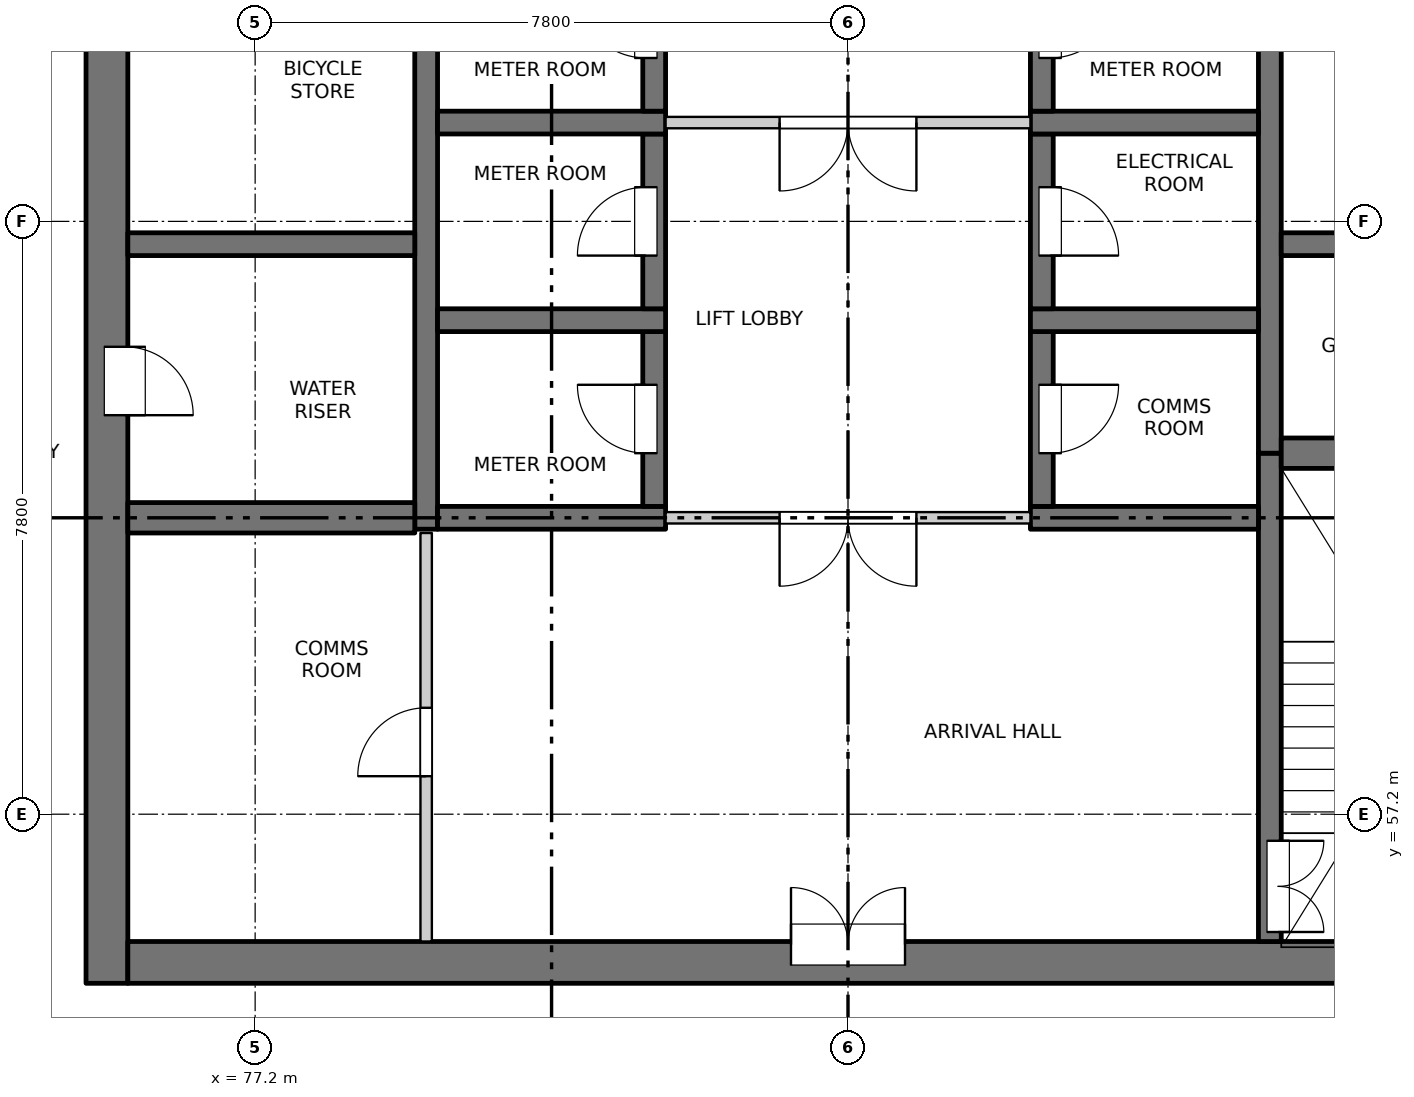
"""IFC4 building model, lengths in metres.
Left out: names, types, materials, properties, quantities, classifications, styles, units other than length and angle.
Written with IfcOpenShell. Run it as: python <this file> out.ifc"""

import sys

from ifc_helpers import new_model, si_unit, direction, frame, frame_2d, origin, place, context, subcontext, project, spatial, rectangle, extrude, element, fill, save


model = new_model("IFC4")
c1 = context("Model", 3, precision=1e-05, world=origin(), true_north=direction((0.0, 1.0)))
c2 = subcontext(c1, "Body", "Model", "MODEL_VIEW")
j1 = project(units=[si_unit("LENGTHUNIT", "METRE"), si_unit("PLANEANGLEUNIT", "RADIAN")], contexts=[c1])
p1 = place(None, origin())
s1 = spatial("IfcSite", under=j1, at=p1, CompositionType="ELEMENT")
p2 = place(p1, origin())
s2 = spatial("IfcBuilding", under=s1, at=p2, CompositionType="ELEMENT")
p3 = place(p2, frame((0.0, 0.0, 148.6)))
s3 = spatial("IfcBuildingStorey", under=s2, at=p3, CompositionType="ELEMENT", Elevation=148.6)
p4 = place(p3, frame((75.25, 54.975, -0.3), z_axis=(0.0, 0.0, 1.0), x_axis=(0.0, 1.0, 0.0)))
e1 = element("IfcWall", 1, at=p4, inside=s3, PredefinedType="SOLIDWALL", context=c2, shape_type="SweptSolid", body=[
    extrude(rectangle(XDim=22.325, YDim=0.55, at=frame_2d((11.163, 0.0))), origin(), (0.0, 0.0, 1.0), 3.45),
])
p5 = place(p4, frame((7.475, 0.0, 0.3)))
e2 = element("IfcOpeningElement", 2, at=p5, cuts=e1, PredefinedType="OPENING", context=c2, shape_type="SweptSolid", body=[
    extrude(rectangle(XDim=0.9, YDim=2.1, at=frame_2d((0.45, 1.05))), frame((0.0, 0.285, 0.0), z_axis=(0.0, -1.0, 0.0), x_axis=(1.0, 0.0, 0.0)), (0.0, 0.0, 1.0), 0.57),
])
p6 = place(p4, frame((13.775, 0.0, 0.3)))
e3 = element("IfcOpeningElement", 3, at=p6, cuts=e1, PredefinedType="OPENING", context=c2, shape_type="SweptSolid", body=[
    extrude(rectangle(XDim=0.9, YDim=2.1, at=frame_2d((0.45, 1.05))), frame((0.0, 0.285, 0.0), z_axis=(0.0, -1.0, 0.0), x_axis=(1.0, 0.0, 0.0)), (0.0, 0.0, 1.0), 0.57),
])
p7 = place(p4, frame((20.075, 0.0, 0.3)))
e4 = element("IfcOpeningElement", 4, at=p7, cuts=e1, PredefinedType="OPENING", context=c2, shape_type="SweptSolid", body=[
    extrude(rectangle(XDim=0.9, YDim=2.1, at=frame_2d((0.45, 1.05))), frame((0.0, 0.285, 0.0), z_axis=(0.0, -1.0, 0.0), x_axis=(1.0, 0.0, 0.0)), (0.0, 0.0, 1.0), 0.57),
])
p8 = place(p3, frame((75.525, 55.25, -0.3), z_axis=(0.0, 0.0, 1.0), x_axis=(1.0, 0.0, 0.0)))
e5 = element("IfcWall", 5, at=p8, inside=s3, PredefinedType="SOLIDWALL", context=c2, shape_type="SweptSolid", body=[
    extrude(rectangle(XDim=18.95, YDim=0.55, at=frame_2d((9.475, 0.0))), origin(), (0.0, 0.0, 1.0), 3.45),
])
p9 = place(p8, frame((8.725, 0.0, 0.3)))
e6 = element("IfcOpeningElement", 6, at=p9, cuts=e5, PredefinedType="OPENING", context=c2, shape_type="SweptSolid", body=[
    extrude(rectangle(XDim=1.5, YDim=2.1, at=frame_2d((0.75, 1.05))), frame((0.0, 0.285, 0.0), z_axis=(0.0, -1.0, 0.0), x_axis=(1.0, 0.0, 0.0)), (0.0, 0.0, 1.0), 0.57),
])
p10 = place(p3, frame((79.45, 60.95, -0.3), z_axis=(0.0, 0.0, 1.0), x_axis=(0.0, 1.0, 0.0)))
e7 = element("IfcWall", 7, at=p10, inside=s3, PredefinedType="SOLIDWALL", context=c2, shape_type="SweptSolid", body=[
    extrude(rectangle(XDim=16.35, YDim=0.3, at=frame_2d((8.175, 0.0))), origin(), (0.0, 0.0, 1.0), 3.45),
])
p11 = place(p3, frame((90.55, 55.525, -0.3), z_axis=(0.0, 0.0, 1.0), x_axis=(0.0, 1.0, 0.0)))
e8 = element("IfcWall", 8, at=p11, inside=s3, PredefinedType="SOLIDWALL", context=c2, shape_type="SweptSolid", body=[
    extrude(rectangle(XDim=6.425, YDim=0.3, at=frame_2d((3.212, 0.0))), origin(), (0.0, 0.0, 1.0), 3.45),
])
p12 = place(p11, frame((0.125, 0.0, 0.3)))
e9 = element("IfcOpeningElement", 9, at=p12, cuts=e8, PredefinedType="OPENING", context=c2, shape_type="SweptSolid", body=[
    extrude(rectangle(XDim=1.2, YDim=2.1, at=frame_2d((0.6, 1.05))), frame((0.0, 0.16, 0.0), z_axis=(0.0, -1.0, 0.0), x_axis=(1.0, 0.0, 0.0)), (0.0, 0.0, 1.0), 0.32),
])
p13 = place(p3, frame((90.55, 61.95, -0.3), z_axis=(0.0, 0.0, 1.0), x_axis=(0.0, 1.0, 0.0)))
e10 = element("IfcWall", 10, at=p13, inside=s3, PredefinedType="SOLIDWALL", context=c2, shape_type="SweptSolid", body=[
    extrude(rectangle(XDim=15.35, YDim=0.3, at=frame_2d((7.675, 0.0))), origin(), (0.0, 0.0, 1.0), 3.45),
])
p14 = place(p3, frame((79.6, 61.1, -0.3), z_axis=(0.0, 0.0, 1.0), x_axis=(1.0, 0.0, 0.0)))
e11 = element("IfcWall", 11, at=p14, inside=s3, PredefinedType="SOLIDWALL", context=c2, shape_type="SweptSolid", body=[
    extrude(rectangle(XDim=3.0, YDim=0.3, at=frame_2d((1.5, 0.0))), origin(), (0.0, 0.0, 1.0), 3.45),
])
p15 = place(p3, frame((82.45, 61.25, -0.3), z_axis=(0.0, 0.0, 1.0), x_axis=(0.0, 1.0, 0.0)))
e12 = element("IfcWall", 12, at=p15, inside=s3, PredefinedType="SOLIDWALL", context=c2, shape_type="SweptSolid", body=[
    extrude(rectangle(XDim=2.3, YDim=0.3, at=frame_2d((1.15, 0.0))), origin(), (0.0, 0.0, 1.0), 3.45),
])
p16 = place(p15, frame((0.7, 0.0, 0.3)))
e13 = element("IfcOpeningElement", 13, at=p16, cuts=e12, PredefinedType="OPENING", context=c2, shape_type="SweptSolid", body=[
    extrude(rectangle(XDim=0.9, YDim=2.1, at=frame_2d((0.45, 1.05))), frame((0.0, 0.16, 0.0), z_axis=(0.0, -1.0, 0.0), x_axis=(1.0, 0.0, 0.0)), (0.0, 0.0, 1.0), 0.32),
])
p17 = place(p3, frame((79.6, 63.7, -0.3), z_axis=(0.0, 0.0, 1.0), x_axis=(1.0, 0.0, 0.0)))
e14 = element("IfcWall", 14, at=p17, inside=s3, PredefinedType="SOLIDWALL", context=c2, shape_type="SweptSolid", body=[
    extrude(rectangle(XDim=3.0, YDim=0.3, at=frame_2d((1.5, 0.0))), origin(), (0.0, 0.0, 1.0), 3.45),
])
p18 = place(p3, frame((82.45, 63.85, -0.3), z_axis=(0.0, 0.0, 1.0), x_axis=(0.0, 1.0, 0.0)))
e15 = element("IfcWall", 15, at=p18, inside=s3, PredefinedType="SOLIDWALL", context=c2, shape_type="SweptSolid", body=[
    extrude(rectangle(XDim=2.3, YDim=0.3, at=frame_2d((1.15, 0.0))), origin(), (0.0, 0.0, 1.0), 3.45),
])
p19 = place(p18, frame((0.7, 0.0, 0.3)))
e16 = element("IfcOpeningElement", 16, at=p19, cuts=e15, PredefinedType="OPENING", context=c2, shape_type="SweptSolid", body=[
    extrude(rectangle(XDim=0.9, YDim=2.1, at=frame_2d((0.45, 1.05))), frame((0.0, 0.16, 0.0), z_axis=(0.0, -1.0, 0.0), x_axis=(1.0, 0.0, 0.0)), (0.0, 0.0, 1.0), 0.32),
])
p20 = place(p3, frame((79.6, 66.3, -0.3), z_axis=(0.0, 0.0, 1.0), x_axis=(1.0, 0.0, 0.0)))
e17 = element("IfcWall", 17, at=p20, inside=s3, PredefinedType="SOLIDWALL", context=c2, shape_type="SweptSolid", body=[
    extrude(rectangle(XDim=3.0, YDim=0.3, at=frame_2d((1.5, 0.0))), origin(), (0.0, 0.0, 1.0), 3.45),
])
p21 = place(p3, frame((82.45, 66.45, -0.3), z_axis=(0.0, 0.0, 1.0), x_axis=(0.0, 1.0, 0.0)))
e18 = element("IfcWall", 18, at=p21, inside=s3, PredefinedType="SOLIDWALL", context=c2, shape_type="SweptSolid", body=[
    extrude(rectangle(XDim=2.3, YDim=0.3, at=frame_2d((1.15, 0.0))), origin(), (0.0, 0.0, 1.0), 3.45),
])
p22 = place(p21, frame((0.7, 0.0, 0.3)))
e19 = element("IfcOpeningElement", 19, at=p22, cuts=e18, PredefinedType="OPENING", context=c2, shape_type="SweptSolid", body=[
    extrude(rectangle(XDim=0.9, YDim=2.1, at=frame_2d((0.45, 1.05))), frame((0.0, 0.16, 0.0), z_axis=(0.0, -1.0, 0.0), x_axis=(1.0, 0.0, 0.0)), (0.0, 0.0, 1.0), 0.32),
])
p23 = place(p3, frame((87.4, 61.1, -0.3), z_axis=(0.0, 0.0, 1.0), x_axis=(1.0, 0.0, 0.0)))
e20 = element("IfcWall", 20, at=p23, inside=s3, PredefinedType="SOLIDWALL", context=c2, shape_type="SweptSolid", body=[
    extrude(rectangle(XDim=3.0, YDim=0.3, at=frame_2d((1.5, 0.0))), origin(), (0.0, 0.0, 1.0), 3.45),
])
p24 = place(p3, frame((87.55, 61.25, -0.3), z_axis=(0.0, 0.0, 1.0), x_axis=(0.0, 1.0, 0.0)))
e21 = element("IfcWall", 21, at=p24, inside=s3, PredefinedType="SOLIDWALL", context=c2, shape_type="SweptSolid", body=[
    extrude(rectangle(XDim=2.3, YDim=0.3, at=frame_2d((1.15, 0.0))), origin(), (0.0, 0.0, 1.0), 3.45),
])
p25 = place(p24, frame((0.7, 0.0, 0.3)))
e22 = element("IfcOpeningElement", 22, at=p25, cuts=e21, PredefinedType="OPENING", context=c2, shape_type="SweptSolid", body=[
    extrude(rectangle(XDim=0.9, YDim=2.1, at=frame_2d((0.45, 1.05))), frame((0.0, 0.16, 0.0), z_axis=(0.0, -1.0, 0.0), x_axis=(1.0, 0.0, 0.0)), (0.0, 0.0, 1.0), 0.32),
])
p26 = place(p3, frame((87.4, 63.7, -0.3), z_axis=(0.0, 0.0, 1.0), x_axis=(1.0, 0.0, 0.0)))
e23 = element("IfcWall", 23, at=p26, inside=s3, PredefinedType="SOLIDWALL", context=c2, shape_type="SweptSolid", body=[
    extrude(rectangle(XDim=3.0, YDim=0.3, at=frame_2d((1.5, 0.0))), origin(), (0.0, 0.0, 1.0), 3.45),
])
p27 = place(p3, frame((87.55, 63.85, -0.3), z_axis=(0.0, 0.0, 1.0), x_axis=(0.0, 1.0, 0.0)))
e24 = element("IfcWall", 24, at=p27, inside=s3, PredefinedType="SOLIDWALL", context=c2, shape_type="SweptSolid", body=[
    extrude(rectangle(XDim=2.3, YDim=0.3, at=frame_2d((1.15, 0.0))), origin(), (0.0, 0.0, 1.0), 3.45),
])
p28 = place(p27, frame((0.7, 0.0, 0.3)))
e25 = element("IfcOpeningElement", 25, at=p28, cuts=e24, PredefinedType="OPENING", context=c2, shape_type="SweptSolid", body=[
    extrude(rectangle(XDim=0.9, YDim=2.1, at=frame_2d((0.45, 1.05))), frame((0.0, 0.16, 0.0), z_axis=(0.0, -1.0, 0.0), x_axis=(1.0, 0.0, 0.0)), (0.0, 0.0, 1.0), 0.32),
])
p29 = place(p3, frame((87.4, 66.3, -0.3), z_axis=(0.0, 0.0, 1.0), x_axis=(1.0, 0.0, 0.0)))
e26 = element("IfcWall", 26, at=p29, inside=s3, PredefinedType="SOLIDWALL", context=c2, shape_type="SweptSolid", body=[
    extrude(rectangle(XDim=3.0, YDim=0.3, at=frame_2d((1.5, 0.0))), origin(), (0.0, 0.0, 1.0), 3.45),
])
p30 = place(p3, frame((87.55, 66.45, -0.3), z_axis=(0.0, 0.0, 1.0), x_axis=(0.0, 1.0, 0.0)))
e27 = element("IfcWall", 27, at=p30, inside=s3, PredefinedType="SOLIDWALL", context=c2, shape_type="SweptSolid", body=[
    extrude(rectangle(XDim=2.3, YDim=0.3, at=frame_2d((1.15, 0.0))), origin(), (0.0, 0.0, 1.0), 3.45),
])
p31 = place(p30, frame((0.7, 0.0, 0.3)))
e28 = element("IfcOpeningElement", 28, at=p31, cuts=e27, PredefinedType="OPENING", context=c2, shape_type="SweptSolid", body=[
    extrude(rectangle(XDim=0.9, YDim=2.1, at=frame_2d((0.45, 1.05))), frame((0.0, 0.16, 0.0), z_axis=(0.0, -1.0, 0.0), x_axis=(1.0, 0.0, 0.0)), (0.0, 0.0, 1.0), 0.32),
])
p32 = place(p3, frame((75.525, 61.1, -0.3), z_axis=(0.0, 0.0, 1.0), x_axis=(1.0, 0.0, 0.0)))
e29 = element("IfcWall", 29, at=p32, inside=s3, PredefinedType="SOLIDWALL", context=c2, shape_type="SweptSolid", body=[
    extrude(rectangle(XDim=3.775, YDim=0.4, at=frame_2d((1.888, 0.0))), origin(), (0.0, 0.0, 1.0), 3.45),
])
p33 = place(p3, frame((75.525, 64.7, -0.3), z_axis=(0.0, 0.0, 1.0), x_axis=(1.0, 0.0, 0.0)))
e30 = element("IfcWall", 30, at=p33, inside=s3, PredefinedType="SOLIDWALL", context=c2, shape_type="SweptSolid", body=[
    extrude(rectangle(XDim=3.775, YDim=0.3, at=frame_2d((1.888, 0.0))), origin(), (0.0, 0.0, 1.0), 3.45),
])
p34 = place(p3, frame((90.7, 61.95, -0.3), z_axis=(0.0, 0.0, 1.0), x_axis=(1.0, 0.0, 0.0)))
e31 = element("IfcWall", 31, at=p34, inside=s3, PredefinedType="SOLIDWALL", context=c2, shape_type="SweptSolid", body=[
    extrude(rectangle(XDim=3.775, YDim=0.4, at=frame_2d((1.888, 0.0))), origin(), (0.0, 0.0, 1.0), 3.45),
])
p35 = place(p3, frame((90.7, 64.7, -0.3), z_axis=(0.0, 0.0, 1.0), x_axis=(1.0, 0.0, 0.0)))
e32 = element("IfcWall", 32, at=p35, inside=s3, PredefinedType="SOLIDWALL", context=c2, shape_type="SweptSolid", body=[
    extrude(rectangle(XDim=3.775, YDim=0.3, at=frame_2d((1.888, 0.0))), origin(), (0.0, 0.0, 1.0), 3.45),
])
p36 = place(p3, frame((82.6, 61.1, 0.0), z_axis=(0.0, 0.0, 1.0), x_axis=(1.0, 0.0, 0.0)))
e33 = element("IfcWall", 33, at=p36, inside=s3, PredefinedType="PARTITIONING", context=c2, shape_type="SweptSolid", body=[
    extrude(rectangle(XDim=4.8, YDim=0.15, at=frame_2d((2.4, 0.0))), origin(), (0.0, 0.0, 1.0), 3.15),
])
p37 = place(p36, frame((1.5, 0.0, 0.0)))
e34 = element("IfcOpeningElement", 34, at=p37, cuts=e33, PredefinedType="OPENING", context=c2, shape_type="SweptSolid", body=[
    extrude(rectangle(XDim=1.8, YDim=2.1, at=frame_2d((0.9, 1.05))), frame((0.0, 0.085, 0.0), z_axis=(0.0, -1.0, 0.0), x_axis=(1.0, 0.0, 0.0)), (0.0, 0.0, 1.0), 0.17),
])
p38 = place(p3, frame((82.6, 66.3, 0.0), z_axis=(0.0, 0.0, 1.0), x_axis=(1.0, 0.0, 0.0)))
e35 = element("IfcWall", 35, at=p38, inside=s3, PredefinedType="PARTITIONING", context=c2, shape_type="SweptSolid", body=[
    extrude(rectangle(XDim=4.8, YDim=0.15, at=frame_2d((2.4, 0.0))), origin(), (0.0, 0.0, 1.0), 3.15),
])
p39 = place(p38, frame((1.5, 0.0, 0.0)))
e36 = element("IfcOpeningElement", 36, at=p39, cuts=e35, PredefinedType="OPENING", context=c2, shape_type="SweptSolid", body=[
    extrude(rectangle(XDim=1.8, YDim=2.1, at=frame_2d((0.9, 1.05))), frame((0.0, 0.085, 0.0), z_axis=(0.0, -1.0, 0.0), x_axis=(1.0, 0.0, 0.0)), (0.0, 0.0, 1.0), 0.17),
])
p40 = place(p3, frame((79.45, 55.525, 0.0), z_axis=(0.0, 0.0, 1.0), x_axis=(0.0, 1.0, 0.0)))
e37 = element("IfcWall", 37, at=p40, inside=s3, PredefinedType="PARTITIONING", context=c2, shape_type="SweptSolid", body=[
    extrude(rectangle(XDim=5.375, YDim=0.15, at=frame_2d((2.688, 0.0))), origin(), (0.0, 0.0, 1.0), 3.15),
])
p41 = place(p40, frame((2.175, 0.0, 0.0)))
e38 = element("IfcOpeningElement", 38, at=p41, cuts=e37, PredefinedType="OPENING", context=c2, shape_type="SweptSolid", body=[
    extrude(rectangle(XDim=0.9, YDim=2.1, at=frame_2d((0.45, 1.05))), frame((0.0, 0.085, 0.0), z_axis=(0.0, -1.0, 0.0), x_axis=(1.0, 0.0, 0.0)), (0.0, 0.0, 1.0), 0.17),
])
p42 = place(p9, origin())
e39 = element("IfcDoor", 39, at=p42, inside=s3, OperationType="DOUBLE_DOOR_SINGLE_SWING", PredefinedType="DOOR", context=c2, shape_type="SweptSolid", body=[
    extrude(rectangle(XDim=1.5, YDim=2.1, at=frame_2d((0.75, 1.05))), frame((0.0, 0.26, 0.0), z_axis=(0.0, -1.0, 0.0), x_axis=(1.0, 0.0, 0.0)), (0.0, 0.0, 1.0), 0.05),
])
fill(e6, e39)
p43 = place(p12, origin())
e40 = element("IfcDoor", 40, at=p43, inside=s3, OperationType="DOUBLE_DOOR_SINGLE_SWING", PredefinedType="DOOR", context=c2, shape_type="SweptSolid", body=[
    extrude(rectangle(XDim=1.2, YDim=2.1, at=frame_2d((0.6, 1.05))), frame((0.0, -0.085, 0.0), z_axis=(0.0, -1.0, 0.0), x_axis=(1.0, 0.0, 0.0)), (0.0, 0.0, 1.0), 0.05),
])
fill(e9, e40)
p44 = place(p41, origin())
e41 = element("IfcDoor", 41, at=p44, inside=s3, OperationType="SINGLE_SWING_LEFT", PredefinedType="DOOR", context=c2, shape_type="SweptSolid", body=[
    extrude(rectangle(XDim=0.9, YDim=2.1, at=frame_2d((0.45, 1.05))), frame((0.0, 0.025, 0.0), z_axis=(0.0, -1.0, 0.0), x_axis=(1.0, 0.0, 0.0)), (0.0, 0.0, 1.0), 0.05),
])
fill(e38, e41)
p45 = place(p37, origin())
e42 = element("IfcDoor", 42, at=p45, inside=s3, OperationType="DOUBLE_DOOR_SINGLE_SWING", PredefinedType="DOOR", context=c2, shape_type="SweptSolid", body=[
    extrude(rectangle(XDim=1.8, YDim=2.1, at=frame_2d((0.9, 1.05))), frame((0.0, 0.025, 0.0), z_axis=(0.0, -1.0, 0.0), x_axis=(1.0, 0.0, 0.0)), (0.0, 0.0, 1.0), 0.05),
])
fill(e34, e42)
p46 = place(p16, origin())
e43 = element("IfcDoor", 43, at=p46, inside=s3, OperationType="SINGLE_SWING_RIGHT", PredefinedType="DOOR", context=c2, shape_type="SweptSolid", body=[
    extrude(rectangle(XDim=0.9, YDim=2.1, at=frame_2d((0.45, 1.05))), frame((0.0, 0.135, 0.0), z_axis=(0.0, -1.0, 0.0), x_axis=(1.0, 0.0, 0.0)), (0.0, 0.0, 1.0), 0.05),
])
fill(e13, e43)
p47 = place(p25, origin())
e44 = element("IfcDoor", 44, at=p47, inside=s3, OperationType="SINGLE_SWING_LEFT", PredefinedType="DOOR", context=c2, shape_type="SweptSolid", body=[
    extrude(rectangle(XDim=0.9, YDim=2.1, at=frame_2d((0.45, 1.05))), frame((0.0, -0.085, 0.0), z_axis=(0.0, -1.0, 0.0), x_axis=(1.0, 0.0, 0.0)), (0.0, 0.0, 1.0), 0.05),
])
fill(e22, e44)
p48 = place(p5, origin())
e45 = element("IfcDoor", 45, at=p48, inside=s3, OperationType="SINGLE_SWING_RIGHT", PredefinedType="DOOR", context=c2, shape_type="SweptSolid", body=[
    extrude(rectangle(XDim=0.9, YDim=2.1, at=frame_2d((0.45, 1.05))), frame((0.0, -0.21, 0.0), z_axis=(0.0, -1.0, 0.0), x_axis=(1.0, 0.0, 0.0)), (0.0, 0.0, 1.0), 0.05),
])
fill(e2, e45)
p49 = place(p19, origin())
e46 = element("IfcDoor", 46, at=p49, inside=s3, OperationType="SINGLE_SWING_LEFT", PredefinedType="DOOR", context=c2, shape_type="SweptSolid", body=[
    extrude(rectangle(XDim=0.9, YDim=2.1, at=frame_2d((0.45, 1.05))), frame((0.0, 0.135, 0.0), z_axis=(0.0, -1.0, 0.0), x_axis=(1.0, 0.0, 0.0)), (0.0, 0.0, 1.0), 0.05),
])
fill(e16, e46)
p50 = place(p28, origin())
e47 = element("IfcDoor", 47, at=p50, inside=s3, OperationType="SINGLE_SWING_RIGHT", PredefinedType="DOOR", context=c2, shape_type="SweptSolid", body=[
    extrude(rectangle(XDim=0.9, YDim=2.1, at=frame_2d((0.45, 1.05))), frame((0.0, -0.085, 0.0), z_axis=(0.0, -1.0, 0.0), x_axis=(1.0, 0.0, 0.0)), (0.0, 0.0, 1.0), 0.05),
])
fill(e25, e47)
p51 = place(p39, origin())
e48 = element("IfcDoor", 48, at=p51, inside=s3, OperationType="DOUBLE_DOOR_SINGLE_SWING", PredefinedType="DOOR", context=c2, shape_type="SweptSolid", body=[
    extrude(rectangle(XDim=1.8, YDim=2.1, at=frame_2d((0.9, 1.05))), frame((0.0, 0.025, 0.0), z_axis=(0.0, -1.0, 0.0), x_axis=(1.0, 0.0, 0.0)), (0.0, 0.0, 1.0), 0.05),
])
fill(e36, e48)
p52 = place(p22, origin())
e49 = element("IfcDoor", 49, at=p52, inside=s3, OperationType="SINGLE_SWING_RIGHT", PredefinedType="DOOR", context=c2, shape_type="SweptSolid", body=[
    extrude(rectangle(XDim=0.9, YDim=2.1, at=frame_2d((0.45, 1.05))), frame((0.0, 0.135, 0.0), z_axis=(0.0, -1.0, 0.0), x_axis=(1.0, 0.0, 0.0)), (0.0, 0.0, 1.0), 0.05),
])
fill(e19, e49)
p53 = place(p31, origin())
e50 = element("IfcDoor", 50, at=p53, inside=s3, OperationType="SINGLE_SWING_LEFT", PredefinedType="DOOR", context=c2, shape_type="SweptSolid", body=[
    extrude(rectangle(XDim=0.9, YDim=2.1, at=frame_2d((0.45, 1.05))), frame((0.0, -0.085, 0.0), z_axis=(0.0, -1.0, 0.0), x_axis=(1.0, 0.0, 0.0)), (0.0, 0.0, 1.0), 0.05),
])
fill(e28, e50)
save(model, sys.argv[1])
